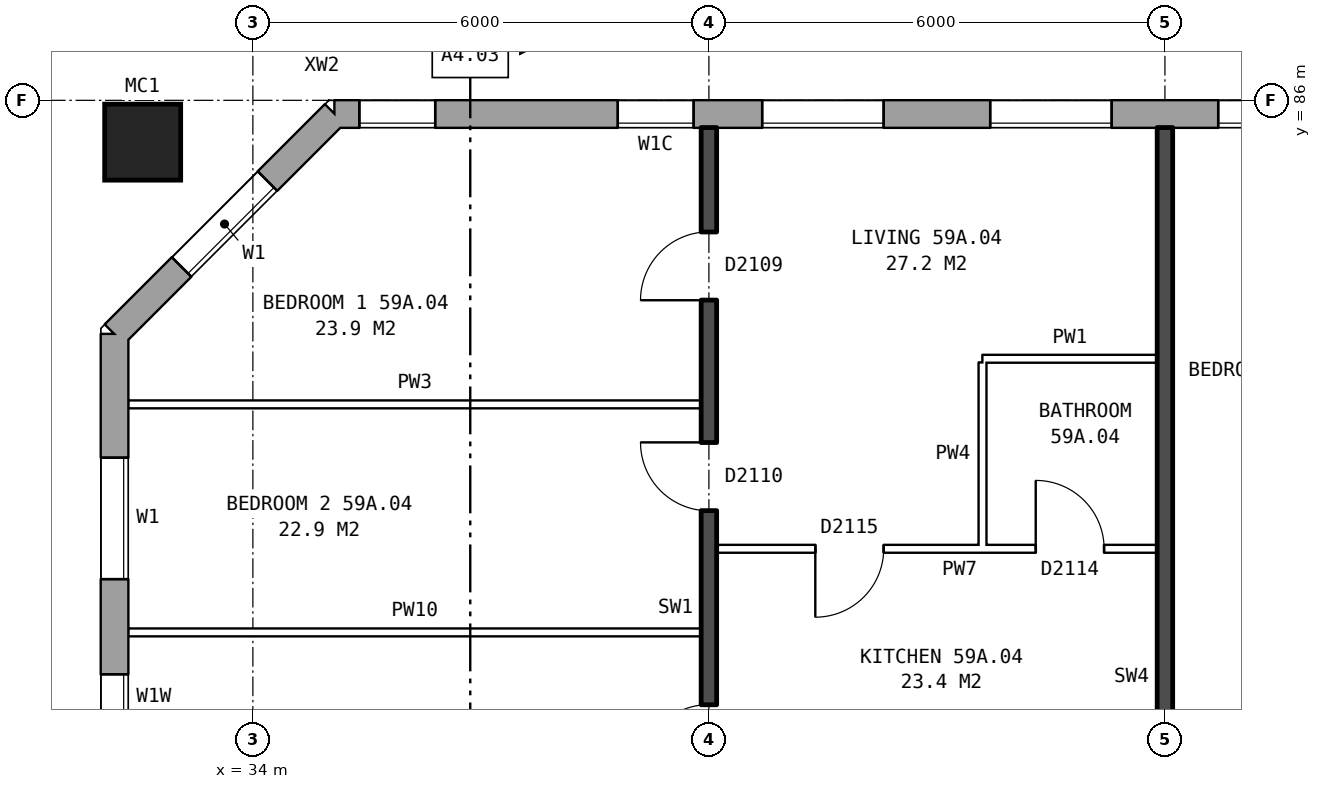
"""IFC4 building model, lengths in metres.
Left out: names, types, materials, properties, quantities, classifications, styles, units other than length and angle.
Written with IfcOpenShell. Run it as: python <this file> out.ifc"""

import sys

from ifc_helpers import new_model, si_unit, direction, frame, frame_2d, origin, origin_2d, place, context, subcontext, project, spatial, rectangle, hollow_rectangle, extrude, element, fill, save


model = new_model("IFC4")
c1 = context("Model", 3, precision=1e-05, world=origin(), true_north=direction((0.0, 1.0)))
c2 = subcontext(c1, "Body", "Model", "MODEL_VIEW")
j1 = project(units=[si_unit("LENGTHUNIT", "METRE"), si_unit("PLANEANGLEUNIT", "RADIAN")], contexts=[c1])
p1 = place(None, origin())
s1 = spatial("IfcSite", under=j1, at=p1, CompositionType="ELEMENT")
p2 = place(p1, origin())
s2 = spatial("IfcBuilding", under=s1, at=p2, CompositionType="ELEMENT")
p3 = place(p2, frame((0.0, 0.0, 209.0)))
s3 = spatial("IfcBuildingStorey", under=s2, at=p3, CompositionType="ELEMENT", Elevation=209.0)
p4 = place(p3, frame((32.55, 85.45, 0.0), z_axis=(0.0, 0.0, 1.0), x_axis=(1.0, 0.0, 0.0)))
e1 = element("IfcColumn", 1, at=p4, inside=s3, PredefinedType="COLUMN", context=c2, shape_type="SweptSolid", body=[
    extrude(hollow_rectangle(XDim=1.0, YDim=1.0, WallThickness=0.055, at=origin_2d()), origin(), (0.0, 0.0, 1.0), 3.1),
])
p5 = place(p3, frame((74.95, 85.82, 0.0), z_axis=(0.0, 0.0, 1.0), x_axis=(-1.0, 0.0, 0.0)))
e2 = element("IfcWall", 2, at=p5, inside=s3, PredefinedType="STANDARD", context=c2, shape_type="SweptSolid", body=[
    extrude(rectangle(XDim=39.875, YDim=0.36, at=frame_2d((19.938, 0.0))), origin(), (0.0, 0.0, 1.0), 2.85),
])
p6 = place(p5, frame((0.3, 0.0, 0.8)))
e3 = element("IfcOpeningElement", 3, at=p6, cuts=e2, PredefinedType="OPENING", context=c2, shape_type="SweptSolid", body=[
    extrude(rectangle(XDim=0.8, YDim=1.5, at=frame_2d((0.4, 0.75))), frame((0.0, 0.19, 0.0), z_axis=(0.0, -1.0, 0.0), x_axis=(1.0, 0.0, 0.0)), (0.0, 0.0, 1.0), 0.38),
])
p7 = place(p5, frame((5.65, 0.0, 0.8)))
e4 = element("IfcOpeningElement", 4, at=p7, cuts=e2, PredefinedType="OPENING", context=c2, shape_type="SweptSolid", body=[
    extrude(rectangle(XDim=1.6, YDim=1.8, at=frame_2d((0.8, 0.9))), frame((0.0, 0.19, 0.0), z_axis=(0.0, -1.0, 0.0), x_axis=(1.0, 0.0, 0.0)), (0.0, 0.0, 1.0), 0.38),
])
p8 = place(p5, frame((8.65, 0.0, 0.8)))
e5 = element("IfcOpeningElement", 5, at=p8, cuts=e2, PredefinedType="OPENING", context=c2, shape_type="SweptSolid", body=[
    extrude(rectangle(XDim=1.6, YDim=1.8, at=frame_2d((0.8, 0.9))), frame((0.0, 0.19, 0.0), z_axis=(0.0, -1.0, 0.0), x_axis=(1.0, 0.0, 0.0)), (0.0, 0.0, 1.0), 0.38),
])
p9 = place(p5, frame((11.65, 0.0, 0.8)))
e6 = element("IfcOpeningElement", 6, at=p9, cuts=e2, PredefinedType="OPENING", context=c2, shape_type="SweptSolid", body=[
    extrude(rectangle(XDim=1.6, YDim=1.8, at=frame_2d((0.8, 0.9))), frame((0.0, 0.19, 0.0), z_axis=(0.0, -1.0, 0.0), x_axis=(1.0, 0.0, 0.0)), (0.0, 0.0, 1.0), 0.38),
])
p10 = place(p5, frame((14.65, 0.0, 0.8)))
e7 = element("IfcOpeningElement", 7, at=p10, cuts=e2, PredefinedType="OPENING", context=c2, shape_type="SweptSolid", body=[
    extrude(rectangle(XDim=1.6, YDim=1.8, at=frame_2d((0.8, 0.9))), frame((0.0, 0.19, 0.0), z_axis=(0.0, -1.0, 0.0), x_axis=(1.0, 0.0, 0.0)), (0.0, 0.0, 1.0), 0.38),
])
p11 = place(p5, frame((17.65, 0.0, 0.8)))
e8 = element("IfcOpeningElement", 8, at=p11, cuts=e2, PredefinedType="OPENING", context=c2, shape_type="SweptSolid", body=[
    extrude(rectangle(XDim=1.6, YDim=1.8, at=frame_2d((0.8, 0.9))), frame((0.0, 0.19, 0.0), z_axis=(0.0, -1.0, 0.0), x_axis=(1.0, 0.0, 0.0)), (0.0, 0.0, 1.0), 0.38),
])
p12 = place(p5, frame((20.65, 0.0, 0.8)))
e9 = element("IfcOpeningElement", 9, at=p12, cuts=e2, PredefinedType="OPENING", context=c2, shape_type="SweptSolid", body=[
    extrude(rectangle(XDim=1.6, YDim=1.8, at=frame_2d((0.8, 0.9))), frame((0.0, 0.19, 0.0), z_axis=(0.0, -1.0, 0.0), x_axis=(1.0, 0.0, 0.0)), (0.0, 0.0, 1.0), 0.38),
])
p13 = place(p5, frame((23.65, 0.0, 0.8)))
e10 = element("IfcOpeningElement", 10, at=p13, cuts=e2, PredefinedType="OPENING", context=c2, shape_type="SweptSolid", body=[
    extrude(rectangle(XDim=1.6, YDim=1.8, at=frame_2d((0.8, 0.9))), frame((0.0, 0.19, 0.0), z_axis=(0.0, -1.0, 0.0), x_axis=(1.0, 0.0, 0.0)), (0.0, 0.0, 1.0), 0.38),
])
p14 = place(p5, frame((26.65, 0.0, 0.8)))
e11 = element("IfcOpeningElement", 11, at=p14, cuts=e2, PredefinedType="OPENING", context=c2, shape_type="SweptSolid", body=[
    extrude(rectangle(XDim=1.6, YDim=1.8, at=frame_2d((0.8, 0.9))), frame((0.0, 0.19, 0.0), z_axis=(0.0, -1.0, 0.0), x_axis=(1.0, 0.0, 0.0)), (0.0, 0.0, 1.0), 0.38),
])
p15 = place(p5, frame((29.65, 0.0, 0.8)))
e12 = element("IfcOpeningElement", 12, at=p15, cuts=e2, PredefinedType="OPENING", context=c2, shape_type="SweptSolid", body=[
    extrude(rectangle(XDim=1.6, YDim=1.8, at=frame_2d((0.8, 0.9))), frame((0.0, 0.19, 0.0), z_axis=(0.0, -1.0, 0.0), x_axis=(1.0, 0.0, 0.0)), (0.0, 0.0, 1.0), 0.38),
])
p16 = place(p5, frame((32.65, 0.0, 0.8)))
e13 = element("IfcOpeningElement", 13, at=p16, cuts=e2, PredefinedType="OPENING", context=c2, shape_type="SweptSolid", body=[
    extrude(rectangle(XDim=1.6, YDim=1.8, at=frame_2d((0.8, 0.9))), frame((0.0, 0.19, 0.0), z_axis=(0.0, -1.0, 0.0), x_axis=(1.0, 0.0, 0.0)), (0.0, 0.0, 1.0), 0.38),
])
p17 = place(p5, frame((35.15, 0.0, 0.8)))
e14 = element("IfcOpeningElement", 14, at=p17, cuts=e2, PredefinedType="OPENING", context=c2, shape_type="SweptSolid", body=[
    extrude(rectangle(XDim=1.0, YDim=1.8, at=frame_2d((0.5, 0.9))), frame((0.0, 0.19, 0.0), z_axis=(0.0, -1.0, 0.0), x_axis=(1.0, 0.0, 0.0)), (0.0, 0.0, 1.0), 0.38),
])
p18 = place(p5, frame((1.4, 0.0, 0.8)))
e15 = element("IfcOpeningElement", 15, at=p18, cuts=e2, PredefinedType="OPENING", context=c2, shape_type="SweptSolid", body=[
    extrude(rectangle(XDim=1.4, YDim=1.8, at=frame_2d((0.7, 0.9))), frame((0.0, 0.19, 0.0), z_axis=(0.0, -1.0, 0.0), x_axis=(1.0, 0.0, 0.0)), (0.0, 0.0, 1.0), 0.38),
])
p19 = place(p5, frame((38.55, 0.0, 0.8)))
e16 = element("IfcOpeningElement", 16, at=p19, cuts=e2, PredefinedType="OPENING", context=c2, shape_type="SweptSolid", body=[
    extrude(rectangle(XDim=1.0, YDim=1.8, at=frame_2d((0.5, 0.9))), frame((0.0, 0.19, 0.0), z_axis=(0.0, -1.0, 0.0), x_axis=(1.0, 0.0, 0.0)), (0.0, 0.0, 1.0), 0.38),
])
p20 = place(p3, frame((35.075, 85.82, 0.0), z_axis=(0.0, 0.0, 1.0), x_axis=(-0.707106781187, -0.707106781187, 0.0)))
e17 = element("IfcWall", 17, at=p20, inside=s3, PredefinedType="STANDARD", context=c2, shape_type="SweptSolid", body=[
    extrude(rectangle(XDim=4.094, YDim=0.36, at=frame_2d((2.047, 0.0))), origin(), (0.0, 0.0, 1.0), 2.85),
])
p21 = place(p20, frame((1.247, 0.0, 0.8)))
e18 = element("IfcOpeningElement", 18, at=p21, cuts=e17, PredefinedType="OPENING", context=c2, shape_type="SweptSolid", body=[
    extrude(rectangle(XDim=1.6, YDim=1.8, at=frame_2d((0.8, 0.9))), frame((0.0, 0.19, 0.0), z_axis=(0.0, -1.0, 0.0), x_axis=(1.0, 0.0, 0.0)), (0.0, 0.0, 1.0), 0.38),
])
p22 = place(p3, frame((32.18, 82.925, 0.0), z_axis=(0.0, 0.0, 1.0), x_axis=(0.0, -1.0, 0.0)))
e19 = element("IfcWall", 19, at=p22, inside=s3, PredefinedType="STANDARD", context=c2, shape_type="SweptSolid", body=[
    extrude(rectangle(XDim=25.851, YDim=0.36, at=frame_2d((12.925, 0.0))), origin(), (0.0, 0.0, 1.0), 2.85),
])
p23 = place(p22, frame((1.625, 0.0, 0.8)))
e20 = element("IfcOpeningElement", 20, at=p23, cuts=e19, PredefinedType="OPENING", context=c2, shape_type="SweptSolid", body=[
    extrude(rectangle(XDim=1.6, YDim=1.8, at=frame_2d((0.8, 0.9))), frame((0.0, 0.19, 0.0), z_axis=(0.0, -1.0, 0.0), x_axis=(1.0, 0.0, 0.0)), (0.0, 0.0, 1.0), 0.38),
])
p24 = place(p22, frame((4.475, 0.0, 0.15)))
e21 = element("IfcOpeningElement", 21, at=p24, cuts=e19, PredefinedType="OPENING", context=c2, shape_type="SweptSolid", body=[
    extrude(rectangle(XDim=0.6, YDim=0.9, at=frame_2d((0.3, 0.45))), frame((0.0, 0.19, 0.0), z_axis=(0.0, -1.0, 0.0), x_axis=(1.0, 0.0, 0.0)), (0.0, 0.0, 1.0), 0.38),
])
p25 = place(p22, frame((19.425, 0.0, 0.8)))
e22 = element("IfcOpeningElement", 22, at=p25, cuts=e19, PredefinedType="OPENING", context=c2, shape_type="SweptSolid", body=[
    extrude(rectangle(XDim=0.8, YDim=1.5, at=frame_2d((0.4, 0.75))), frame((0.0, 0.19, 0.0), z_axis=(0.0, -1.0, 0.0), x_axis=(1.0, 0.0, 0.0)), (0.0, 0.0, 1.0), 0.38),
])
p26 = place(p22, frame((22.625, 0.0, 0.8)))
e23 = element("IfcOpeningElement", 23, at=p26, cuts=e19, PredefinedType="OPENING", context=c2, shape_type="SweptSolid", body=[
    extrude(rectangle(XDim=1.6, YDim=1.8, at=frame_2d((0.8, 0.9))), frame((0.0, 0.19, 0.0), z_axis=(0.0, -1.0, 0.0), x_axis=(1.0, 0.0, 0.0)), (0.0, 0.0, 1.0), 0.38),
])
p27 = place(p22, frame((5.375, 0.0, 0.15)))
e24 = element("IfcOpeningElement", 24, at=p27, cuts=e19, PredefinedType="OPENING", context=c2, shape_type="SweptSolid", body=[
    extrude(rectangle(XDim=1.0, YDim=1.8, at=frame_2d((0.5, 0.9))), frame((0.0, 0.19, 0.0), z_axis=(0.0, -1.0, 0.0), x_axis=(1.0, 0.0, 0.0)), (0.0, 0.0, 1.0), 0.38),
])
p28 = place(p22, frame((21.475, 0.0, 1.7)))
e25 = element("IfcOpeningElement", 25, at=p28, cuts=e19, PredefinedType="OPENING", context=c2, shape_type="SweptSolid", body=[
    extrude(rectangle(XDim=0.8, YDim=0.9, at=frame_2d((0.4, 0.45))), frame((0.0, 0.19, 0.0), z_axis=(0.0, -1.0, 0.0), x_axis=(1.0, 0.0, 0.0)), (0.0, 0.0, 1.0), 0.38),
])
p29 = place(p3, frame((32.36, 79.0, 0.0), z_axis=(0.0, 0.0, 1.0), x_axis=(1.0, 0.0, 0.0)))
e26 = element("IfcWall", 26, at=p29, inside=s3, PredefinedType="PARTITIONING", context=c2, shape_type="SweptSolid", body=[
    extrude(rectangle(XDim=7.54, YDim=0.1, at=frame_2d((3.77, 0.0))), origin(), (0.0, 0.0, 1.0), 2.85),
])
p30 = place(p3, frame((40.1, 80.1, 0.0), z_axis=(0.0, 0.0, 1.0), x_axis=(1.0, 0.0, 0.0)))
e27 = element("IfcWall", 27, at=p30, inside=s3, PredefinedType="PARTITIONING", context=c2, shape_type="SweptSolid", body=[
    extrude(rectangle(XDim=5.8, YDim=0.1, at=frame_2d((2.9, 0.0))), origin(), (0.0, 0.0, 1.0), 2.85),
])
p31 = place(p30, frame((1.3, 0.0, 0.0)))
e28 = element("IfcOpeningElement", 28, at=p31, cuts=e27, PredefinedType="OPENING", context=c2, shape_type="SweptSolid", body=[
    extrude(rectangle(XDim=0.9, YDim=2.1, at=frame_2d((0.45, 1.05))), frame((0.0, 0.06, 0.0), z_axis=(0.0, -1.0, 0.0), x_axis=(1.0, 0.0, 0.0)), (0.0, 0.0, 1.0), 0.12),
])
p32 = place(p30, frame((4.2, 0.0, 0.0)))
e29 = element("IfcOpeningElement", 29, at=p32, cuts=e27, PredefinedType="OPENING", context=c2, shape_type="SweptSolid", body=[
    extrude(rectangle(XDim=0.9, YDim=2.1, at=frame_2d((0.45, 1.05))), frame((0.0, 0.06, 0.0), z_axis=(0.0, -1.0, 0.0), x_axis=(1.0, 0.0, 0.0)), (0.0, 0.0, 1.0), 0.12),
])
p33 = place(p3, frame((32.36, 82.0, 0.0), z_axis=(0.0, 0.0, 1.0), x_axis=(1.0, 0.0, 0.0)))
e30 = element("IfcWall", 30, at=p33, inside=s3, PredefinedType="PARTITIONING", context=c2, shape_type="SweptSolid", body=[
    extrude(rectangle(XDim=7.54, YDim=0.1, at=frame_2d((3.77, 0.0))), origin(), (0.0, 0.0, 1.0), 2.85),
])
p34 = place(p3, frame((43.6, 82.6, 0.0), z_axis=(0.0, 0.0, 1.0), x_axis=(1.0, 0.0, 0.0)))
e31 = element("IfcWall", 31, at=p34, inside=s3, PredefinedType="PARTITIONING", context=c2, shape_type="SweptSolid", body=[
    extrude(rectangle(XDim=2.3, YDim=0.1, at=frame_2d((1.15, 0.0))), origin(), (0.0, 0.0, 1.0), 2.85),
])
p35 = place(p3, frame((40.0, 76.2, 0.0), z_axis=(0.0, 0.0, 1.0), x_axis=(0.0, 1.0, 0.0)))
e32 = element("IfcWall", 32, at=p35, inside=s3, PredefinedType="SOLIDWALL", context=c2, shape_type="SweptSolid", body=[
    extrude(rectangle(XDim=9.44, YDim=0.2, at=frame_2d((4.72, 0.0))), origin(), (0.0, 0.0, 1.0), 2.85),
])
p36 = place(p35, frame((7.17, 0.0, 0.0)))
e33 = element("IfcOpeningElement", 33, at=p36, cuts=e32, PredefinedType="OPENING", context=c2, shape_type="SweptSolid", body=[
    extrude(rectangle(XDim=0.9, YDim=2.1, at=frame_2d((0.45, 1.05))), frame((0.0, 0.11, 0.0), z_axis=(0.0, -1.0, 0.0), x_axis=(1.0, 0.0, 0.0)), (0.0, 0.0, 1.0), 0.22),
])
p37 = place(p35, frame((4.4, 0.0, 0.0)))
e34 = element("IfcOpeningElement", 34, at=p37, cuts=e32, PredefinedType="OPENING", context=c2, shape_type="SweptSolid", body=[
    extrude(rectangle(XDim=0.9, YDim=2.1, at=frame_2d((0.45, 1.05))), frame((0.0, 0.11, 0.0), z_axis=(0.0, -1.0, 0.0), x_axis=(1.0, 0.0, 0.0)), (0.0, 0.0, 1.0), 0.22),
])
p38 = place(p35, frame((0.95, 0.0, 0.0)))
e35 = element("IfcOpeningElement", 35, at=p38, cuts=e32, PredefinedType="OPENING", context=c2, shape_type="SweptSolid", body=[
    extrude(rectangle(XDim=0.9, YDim=2.1, at=frame_2d((0.45, 1.05))), frame((0.0, 0.11, 0.0), z_axis=(0.0, -1.0, 0.0), x_axis=(1.0, 0.0, 0.0)), (0.0, 0.0, 1.0), 0.22),
])
p39 = place(p3, frame((43.6, 80.15, 0.0), z_axis=(0.0, 0.0, 1.0), x_axis=(0.0, 1.0, 0.0)))
e36 = element("IfcWall", 36, at=p39, inside=s3, PredefinedType="PARTITIONING", context=c2, shape_type="SweptSolid", body=[
    extrude(rectangle(XDim=2.4, YDim=0.1, at=frame_2d((1.2, 0.0))), origin(), (0.0, 0.0, 1.0), 2.85),
])
p40 = place(p3, frame((46.0, 71.2, 0.0), z_axis=(0.0, 0.0, 1.0), x_axis=(0.0, 1.0, 0.0)))
e37 = element("IfcWall", 37, at=p40, inside=s3, PredefinedType="SOLIDWALL", context=c2, shape_type="SweptSolid", body=[
    extrude(rectangle(XDim=14.44, YDim=0.2, at=frame_2d((7.22, 0.0))), origin(), (0.0, 0.0, 1.0), 2.85),
])
p41 = place(p14, origin())
e38 = element("IfcWindow", 38, at=p41, inside=s3, PartitioningType="SINGLE_PANEL", PredefinedType="WINDOW", context=c2, shape_type="SweptSolid", body=[
    extrude(rectangle(XDim=1.6, YDim=1.8, at=frame_2d((0.8, 0.9))), frame((0.0, 0.15, 0.0), z_axis=(0.0, -1.0, 0.0), x_axis=(1.0, 0.0, 0.0)), (0.0, 0.0, 1.0), 0.06),
])
fill(e11, e38)
p42 = place(p15, origin())
e39 = element("IfcWindow", 39, at=p42, inside=s3, PartitioningType="SINGLE_PANEL", PredefinedType="WINDOW", context=c2, shape_type="SweptSolid", body=[
    extrude(rectangle(XDim=1.6, YDim=1.8, at=frame_2d((0.8, 0.9))), frame((0.0, 0.15, 0.0), z_axis=(0.0, -1.0, 0.0), x_axis=(1.0, 0.0, 0.0)), (0.0, 0.0, 1.0), 0.06),
])
fill(e12, e39)
p43 = place(p16, origin())
e40 = element("IfcWindow", 40, at=p43, inside=s3, PartitioningType="SINGLE_PANEL", PredefinedType="WINDOW", context=c2, shape_type="SweptSolid", body=[
    extrude(rectangle(XDim=1.6, YDim=1.8, at=frame_2d((0.8, 0.9))), frame((0.0, 0.15, 0.0), z_axis=(0.0, -1.0, 0.0), x_axis=(1.0, 0.0, 0.0)), (0.0, 0.0, 1.0), 0.06),
])
fill(e13, e40)
p44 = place(p17, origin())
e41 = element("IfcWindow", 41, at=p44, inside=s3, PartitioningType="SINGLE_PANEL", PredefinedType="WINDOW", context=c2, shape_type="SweptSolid", body=[
    extrude(rectangle(XDim=1.0, YDim=1.8, at=frame_2d((0.5, 0.9))), frame((0.0, 0.15, 0.0), z_axis=(0.0, -1.0, 0.0), x_axis=(1.0, 0.0, 0.0)), (0.0, 0.0, 1.0), 0.06),
])
fill(e14, e41)
p45 = place(p21, origin())
e42 = element("IfcWindow", 42, at=p45, inside=s3, PartitioningType="SINGLE_PANEL", PredefinedType="WINDOW", context=c2, shape_type="SweptSolid", body=[
    extrude(rectangle(XDim=1.6, YDim=1.8, at=frame_2d((0.8, 0.9))), frame((0.0, 0.15, 0.0), z_axis=(0.0, -1.0, 0.0), x_axis=(1.0, 0.0, 0.0)), (0.0, 0.0, 1.0), 0.06),
])
fill(e18, e42)
p46 = place(p23, origin())
e43 = element("IfcWindow", 43, at=p46, inside=s3, PartitioningType="SINGLE_PANEL", PredefinedType="WINDOW", context=c2, shape_type="SweptSolid", body=[
    extrude(rectangle(XDim=1.6, YDim=1.8, at=frame_2d((0.8, 0.9))), frame((0.0, 0.15, 0.0), z_axis=(0.0, -1.0, 0.0), x_axis=(1.0, 0.0, 0.0)), (0.0, 0.0, 1.0), 0.06),
])
fill(e20, e43)
p47 = place(p24, origin())
e44 = element("IfcWindow", 44, at=p47, inside=s3, PartitioningType="SINGLE_PANEL", PredefinedType="WINDOW", context=c2, shape_type="SweptSolid", body=[
    extrude(rectangle(XDim=0.6, YDim=0.9, at=frame_2d((0.3, 0.45))), frame((0.0, 0.15, 0.0), z_axis=(0.0, -1.0, 0.0), x_axis=(1.0, 0.0, 0.0)), (0.0, 0.0, 1.0), 0.06),
])
fill(e21, e44)
p48 = place(p36, origin())
e45 = element("IfcDoor", 45, at=p48, inside=s3, OperationType="SINGLE_SWING_LEFT", PredefinedType="DOOR", context=c2, shape_type="SweptSolid", body=[
    extrude(rectangle(XDim=0.9, YDim=2.1, at=frame_2d((0.45, 1.05))), frame((0.0, 0.025, 0.0), z_axis=(0.0, -1.0, 0.0), x_axis=(1.0, 0.0, 0.0)), (0.0, 0.0, 1.0), 0.05),
])
fill(e33, e45)
p49 = place(p37, origin())
e46 = element("IfcDoor", 46, at=p49, inside=s3, OperationType="SINGLE_SWING_RIGHT", PredefinedType="DOOR", context=c2, shape_type="SweptSolid", body=[
    extrude(rectangle(XDim=0.9, YDim=2.1, at=frame_2d((0.45, 1.05))), frame((0.0, 0.025, 0.0), z_axis=(0.0, -1.0, 0.0), x_axis=(1.0, 0.0, 0.0)), (0.0, 0.0, 1.0), 0.05),
])
fill(e34, e46)
p50 = place(p38, origin())
e47 = element("IfcDoor", 47, at=p50, inside=s3, OperationType="SINGLE_SWING_LEFT", PredefinedType="DOOR", context=c2, shape_type="SweptSolid", body=[
    extrude(rectangle(XDim=0.9, YDim=2.1, at=frame_2d((0.45, 1.05))), frame((0.0, 0.025, 0.0), z_axis=(0.0, -1.0, 0.0), x_axis=(1.0, 0.0, 0.0)), (0.0, 0.0, 1.0), 0.05),
])
fill(e35, e47)
p51 = place(p31, frame((0.9, 0.0, 0.0), z_axis=(0.0, 0.0, 1.0), x_axis=(-1.0, 0.0, 0.0)))
e48 = element("IfcDoor", 48, at=p51, inside=s3, OperationType="SINGLE_SWING_RIGHT", PredefinedType="DOOR", context=c2, shape_type="SweptSolid", body=[
    extrude(rectangle(XDim=0.9, YDim=2.1, at=frame_2d((0.45, 1.05))), frame((0.0, 0.025, 0.0), z_axis=(0.0, -1.0, 0.0), x_axis=(1.0, 0.0, 0.0)), (0.0, 0.0, 1.0), 0.05),
])
fill(e28, e48)
p52 = place(p32, origin())
e49 = element("IfcDoor", 49, at=p52, inside=s3, OperationType="SINGLE_SWING_LEFT", PredefinedType="DOOR", context=c2, shape_type="SweptSolid", body=[
    extrude(rectangle(XDim=0.9, YDim=2.1, at=frame_2d((0.45, 1.05))), frame((0.0, 0.025, 0.0), z_axis=(0.0, -1.0, 0.0), x_axis=(1.0, 0.0, 0.0)), (0.0, 0.0, 1.0), 0.05),
])
fill(e29, e49)
p53 = place(p19, origin())
e50 = element("IfcWindow", 50, at=p53, inside=s3, PartitioningType="SINGLE_PANEL", PredefinedType="WINDOW", context=c2, shape_type="SweptSolid", body=[
    extrude(rectangle(XDim=1.0, YDim=1.8, at=frame_2d((0.5, 0.9))), frame((0.0, 0.15, 0.0), z_axis=(0.0, -1.0, 0.0), x_axis=(1.0, 0.0, 0.0)), (0.0, 0.0, 1.0), 0.06),
])
fill(e16, e50)
save(model, sys.argv[1])
